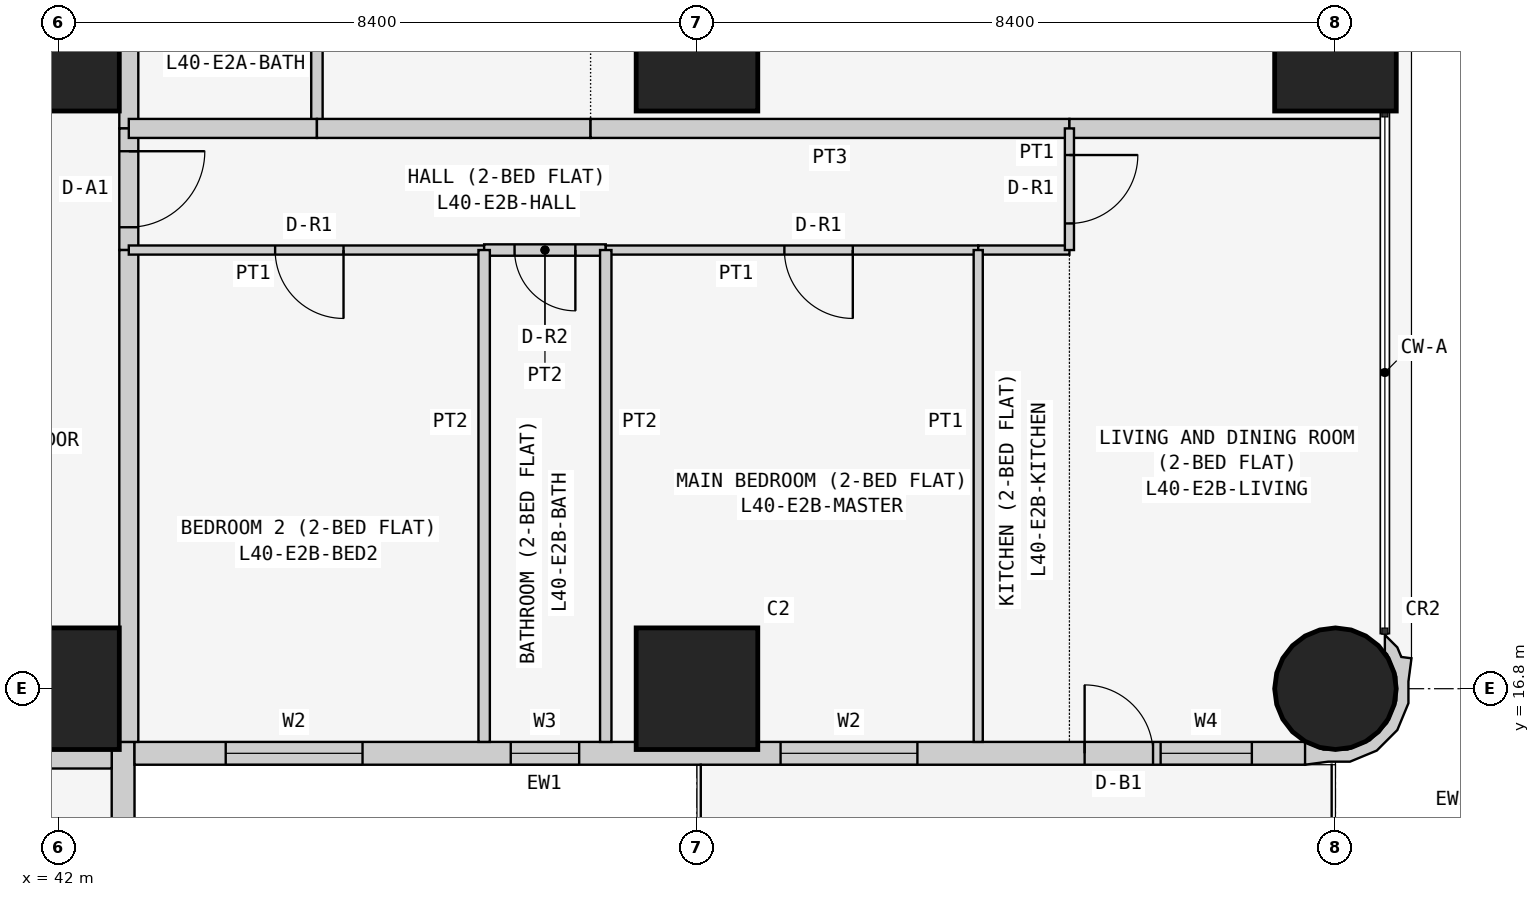
"""IFC4 building model, lengths in metres.
Left out: names, types, materials, properties, quantities, classifications, styles, units other than length and angle.
Written with IfcOpenShell. Run it as: python <this file> out.ifc"""

import sys

from ifc_helpers import new_model, si_unit, direction, frame, frame_2d, origin, origin_2d, place, context, subcontext, project, spatial, polyline, rectangle, circle, outline, extrude, element, fill, save


model = new_model("IFC4")
c1 = context("Model", 3, precision=1e-05, world=origin(), true_north=direction((0.0, 1.0)))
c2 = subcontext(c1, "Body", "Model", "MODEL_VIEW")
j1 = project(units=[si_unit("LENGTHUNIT", "METRE"), si_unit("PLANEANGLEUNIT", "RADIAN")], contexts=[c1])
p1 = place(None, origin())
s1 = spatial("IfcSite", under=j1, at=p1, CompositionType="ELEMENT")
p2 = place(p1, origin())
s2 = spatial("IfcBuilding", under=s1, at=p2, CompositionType="ELEMENT")
p3 = place(p2, frame((0.0, 0.0, 155.7)))
s3 = spatial("IfcBuildingStorey", under=s2, at=p3, CompositionType="ELEMENT", Elevation=155.7)
for number, where, z_axis, x_axis in (
    (1, (42.0, 16.8, 0.0), (0.0, 0.0, 1.0), (1.0, 0.0, 0.0)),
    (2, (42.0, 25.2, 0.0), (0.0, 0.0, 1.0), (1.0, 0.0, 0.0)),
    (3, (50.4, 16.8, 0.0), (0.0, 0.0, 1.0), (1.0, 0.0, 0.0)),
    (4, (50.4, 25.2, 0.0), (0.0, 0.0, 1.0), (1.0, 0.0, 0.0)),
):
    element("IfcColumn", number, at=place(p3, frame(where, z_axis=z_axis, x_axis=x_axis)), inside=s3, PredefinedType="COLUMN", context=c2, shape_type="SweptSolid", body=[
        extrude(rectangle(XDim=1.6, YDim=1.6, at=origin_2d()), origin(), (0.0, 0.0, 1.0), 3.6),
    ])
p4 = place(p3, frame((58.8, 16.8, 0.0), z_axis=(0.0, 0.0, 1.0), x_axis=(1.0, 0.0, 0.0)))
e5 = element("IfcColumn", 5, at=p4, inside=s3, PredefinedType="COLUMN", context=c2, shape_type="SweptSolid", body=[
    extrude(circle(Radius=0.8, at=origin_2d()), origin(), (0.0, 0.0, 1.0), 3.6),
])
p5 = place(p3, frame((58.8, 25.2, 0.0), z_axis=(0.0, 0.0, 1.0), x_axis=(1.0, 0.0, 0.0)))
e6 = element("IfcColumn", 6, at=p5, inside=s3, PredefinedType="COLUMN", context=c2, shape_type="SweptSolid", body=[
    extrude(rectangle(XDim=1.6, YDim=1.6, at=origin_2d()), origin(), (0.0, 0.0, 1.0), 3.6),
])
p6 = place(p3, frame((42.85, 8.8, 0.0), z_axis=(0.0, 0.0, 1.0), x_axis=(0.0, 1.0, 0.0)))
e7 = element("IfcWall", 7, at=p6, inside=s3, PredefinedType="SOLIDWALL", context=c2, shape_type="SweptSolid", body=[
    extrude(rectangle(XDim=7.3, YDim=0.3, at=frame_2d((3.65, 0.0))), origin(), (0.0, 0.0, 1.0), 3.45),
])
p7 = place(p6, frame((3.1, 0.0, 0.9)))
e8 = element("IfcOpeningElement", 8, at=p7, cuts=e7, PredefinedType="OPENING", context=c2, shape_type="SweptSolid", body=[
    extrude(rectangle(XDim=2.4, YDim=1.5, at=frame_2d((1.2, 0.75))), frame((0.0, 0.16, 0.0), z_axis=(0.0, -1.0, 0.0), x_axis=(1.0, 0.0, 0.0)), (0.0, 0.0, 1.0), 0.32),
])
p8 = place(p6, frame((0.75, 0.0, 0.9)))
e9 = element("IfcOpeningElement", 9, at=p8, cuts=e7, PredefinedType="OPENING", context=c2, shape_type="SweptSolid", body=[
    extrude(rectangle(XDim=1.2, YDim=1.5, at=frame_2d((0.6, 0.75))), frame((0.0, 0.16, 0.0), z_axis=(0.0, -1.0, 0.0), x_axis=(1.0, 0.0, 0.0)), (0.0, 0.0, 1.0), 0.32),
])
p9 = place(p3, frame((43.0, 15.95, 0.0), z_axis=(0.0, 0.0, 1.0), x_axis=(1.0, 0.0, 0.0)))
e10 = element("IfcWall", 10, at=p9, inside=s3, PredefinedType="SOLIDWALL", context=c2, shape_type="SweptSolid", body=[
    extrude(rectangle(XDim=15.4, YDim=0.3, at=frame_2d((7.7, 0.0))), origin(), (0.0, 0.0, 1.0), 3.45),
])
p10 = place(p9, frame((1.2, 0.0, 0.9)))
e11 = element("IfcOpeningElement", 11, at=p10, cuts=e10, PredefinedType="OPENING", context=c2, shape_type="SweptSolid", body=[
    extrude(rectangle(XDim=1.8, YDim=1.5, at=frame_2d((0.9, 0.75))), frame((0.0, 0.16, 0.0), z_axis=(0.0, -1.0, 0.0), x_axis=(1.0, 0.0, 0.0)), (0.0, 0.0, 1.0), 0.32),
])
p11 = place(p9, frame((4.95, 0.0, 1.5)))
e12 = element("IfcOpeningElement", 12, at=p11, cuts=e10, PredefinedType="OPENING", context=c2, shape_type="SweptSolid", body=[
    extrude(rectangle(XDim=0.9, YDim=0.7, at=frame_2d((0.45, 0.35))), frame((0.0, 0.16, 0.0), z_axis=(0.0, -1.0, 0.0), x_axis=(1.0, 0.0, 0.0)), (0.0, 0.0, 1.0), 0.32),
])
p12 = place(p9, frame((8.5, 0.0, 0.9)))
e13 = element("IfcOpeningElement", 13, at=p12, cuts=e10, PredefinedType="OPENING", context=c2, shape_type="SweptSolid", body=[
    extrude(rectangle(XDim=1.8, YDim=1.5, at=frame_2d((0.9, 0.75))), frame((0.0, 0.16, 0.0), z_axis=(0.0, -1.0, 0.0), x_axis=(1.0, 0.0, 0.0)), (0.0, 0.0, 1.0), 0.32),
])
p13 = place(p9, frame((12.5, 0.0, 0.0)))
e14 = element("IfcOpeningElement", 14, at=p13, cuts=e10, PredefinedType="OPENING", context=c2, shape_type="SweptSolid", body=[
    extrude(rectangle(XDim=0.9, YDim=2.4, at=frame_2d((0.45, 1.2))), frame((0.0, 0.16, 0.0), z_axis=(0.0, -1.0, 0.0), x_axis=(1.0, 0.0, 0.0)), (0.0, 0.0, 1.0), 0.32),
])
p14 = place(p9, frame((13.5, 0.0, 0.9)))
e15 = element("IfcOpeningElement", 15, at=p14, cuts=e10, PredefinedType="OPENING", context=c2, shape_type="SweptSolid", body=[
    extrude(rectangle(XDim=1.2, YDim=1.5, at=frame_2d((0.6, 0.75))), frame((0.0, 0.16, 0.0), z_axis=(0.0, -1.0, 0.0), x_axis=(1.0, 0.0, 0.0)), (0.0, 0.0, 1.0), 0.32),
])
p15 = place(p3, frame((58.473, 15.983, 0.0), z_axis=(0.0, 0.0, 1.0), x_axis=(0.93923434088, -0.343276641956, 0.0)))
e16 = element("IfcWall", 16, at=p15, inside=s3, PredefinedType="SOLIDWALL", context=c2, shape_type="SweptSolid", body=[
    extrude(outline(polyline([(0.828, 1.599), (0.697, 1.569), (0.604, 1.67), (0.394, 1.767), (0.471, 1.556), (0.508, 1.539), (0.724, 1.304), (0.834, 1.005), (0.82, 0.686), (0.686, 0.397), (0.451, 0.182), (0.152, 0.073), (-0.116, 0.084), (-0.127, 0.078), (-0.146, 0.071), (-0.006, -0.197), (0.266, -0.055), (0.535, 0.044), (0.817, 0.302), (0.978, 0.648), (0.994, 1.03), (0.895, 1.3), (0.828, 1.599)])), origin(), (0.0, 0.0, 1.0), 3.45),
])
p16 = place(p3, frame((42.925, 26.8, 0.0), z_axis=(0.0, 0.0, 1.0), x_axis=(0.0, -1.0, 0.0)))
e17 = element("IfcWall", 17, at=p16, inside=s3, PredefinedType="PARTITIONING", context=c2, shape_type="SweptSolid", body=[
    extrude(rectangle(XDim=2.629, YDim=0.25, at=frame_2d((1.314, 0.0))), origin(), (0.0, 0.0, 1.0), 3.45),
])
p17 = place(p3, frame((42.925, 24.171, 0.0), z_axis=(0.0, 0.0, 1.0), x_axis=(0.0, -1.0, 0.0)))
e18 = element("IfcWall", 18, at=p17, inside=s3, PredefinedType="PARTITIONING", context=c2, shape_type="SweptSolid", body=[
    extrude(rectangle(XDim=1.6, YDim=0.25, at=frame_2d((0.8, 0.0))), origin(), (0.0, 0.0, 1.0), 3.45),
])
p18 = place(p17, frame((0.3, 0.0, 0.0)))
e19 = element("IfcOpeningElement", 19, at=p18, cuts=e18, PredefinedType="OPENING", context=c2, shape_type="SweptSolid", body=[
    extrude(rectangle(XDim=1.0, YDim=2.1, at=frame_2d((0.5, 1.05))), frame((0.0, 0.135, 0.0), z_axis=(0.0, -1.0, 0.0), x_axis=(1.0, 0.0, 0.0)), (0.0, 0.0, 1.0), 0.27),
])
for number, where, z_axis, x_axis in (
    (20, (42.925, 22.571, 0.0), (0.0, 0.0, 1.0), (0.0, -1.0, 0.0)),
    (21, (42.7, 15.875, 0.0), (0.0, 0.0, 1.0), (-1.0, 0.0, 0.0)),
):
    element("IfcWall", number, at=place(p3, frame(where, z_axis=z_axis, x_axis=x_axis)), inside=s3, PredefinedType="PARTITIONING", context=c2, shape_type="SweptSolid", body=[
        extrude(rectangle(XDim=6.471, YDim=0.25, at=frame_2d((3.235, 0.0))), origin(), (0.0, 0.0, 1.0), 3.45),
    ])
p19 = place(p3, frame((45.4, 26.8, 0.0), z_axis=(0.0, 0.0, 1.0), x_axis=(0.0, -1.0, 0.0)))
e22 = element("IfcWall", 22, at=p19, inside=s3, PredefinedType="PARTITIONING", context=c2, shape_type="SweptSolid", body=[
    extrude(rectangle(XDim=2.629, YDim=0.15, at=frame_2d((1.314, 0.0))), origin(), (0.0, 0.0, 1.0), 3.45),
])
p20 = place(p3, frame((45.4, 24.171, 0.0), z_axis=(0.0, 0.0, 1.0), x_axis=(-1.0, 0.0, 0.0)))
e23 = element("IfcWall", 23, at=p20, inside=s3, PredefinedType="PARTITIONING", context=c2, shape_type="SweptSolid", body=[
    extrude(rectangle(XDim=2.475, YDim=0.25, at=frame_2d((1.237, 0.0))), origin(), (0.0, 0.0, 1.0), 3.45),
])
p21 = place(p3, frame((49.0, 24.171, 0.0), z_axis=(0.0, 0.0, 1.0), x_axis=(-1.0, 0.0, 0.0)))
e24 = element("IfcWall", 24, at=p21, inside=s3, PredefinedType="PARTITIONING", context=c2, shape_type="SweptSolid", body=[
    extrude(rectangle(XDim=3.6, YDim=0.25, at=frame_2d((1.8, 0.0))), origin(), (0.0, 0.0, 1.0), 3.45),
])
p22 = place(p3, frame((55.3, 24.171, 0.0), z_axis=(0.0, 0.0, 1.0), x_axis=(-1.0, 0.0, 0.0)))
e25 = element("IfcWall", 25, at=p22, inside=s3, PredefinedType="PARTITIONING", context=c2, shape_type="SweptSolid", body=[
    extrude(rectangle(XDim=6.3, YDim=0.25, at=frame_2d((3.15, 0.0))), origin(), (0.0, 0.0, 1.0), 3.45),
])
p23 = place(p3, frame((59.45, 24.171, 0.0), z_axis=(0.0, 0.0, 1.0), x_axis=(-1.0, 0.0, 0.0)))
e26 = element("IfcWall", 26, at=p23, inside=s3, PredefinedType="PARTITIONING", context=c2, shape_type="SweptSolid", body=[
    extrude(rectangle(XDim=4.15, YDim=0.25, at=frame_2d((2.075, 0.0))), origin(), (0.0, 0.0, 1.0), 3.45),
])
p24 = place(p3, frame((47.6, 22.571, 0.0), z_axis=(0.0, 0.0, 1.0), x_axis=(-1.0, 0.0, 0.0)))
e27 = element("IfcWall", 27, at=p24, inside=s3, PredefinedType="PARTITIONING", context=c2, shape_type="SweptSolid", body=[
    extrude(rectangle(XDim=4.675, YDim=0.12, at=frame_2d((2.337, 0.0))), origin(), (0.0, 0.0, 1.0), 3.45),
])
p25 = place(p24, frame((1.85, 0.0, 0.0)))
e28 = element("IfcOpeningElement", 28, at=p25, cuts=e27, PredefinedType="OPENING", context=c2, shape_type="SweptSolid", body=[
    extrude(rectangle(XDim=0.9, YDim=2.1, at=frame_2d((0.45, 1.05))), frame((0.0, 0.07, 0.0), z_axis=(0.0, -1.0, 0.0), x_axis=(1.0, 0.0, 0.0)), (0.0, 0.0, 1.0), 0.14),
])
p26 = place(p3, frame((49.2, 22.571, 0.0), z_axis=(0.0, 0.0, 1.0), x_axis=(-1.0, 0.0, 0.0)))
e29 = element("IfcWall", 29, at=p26, inside=s3, PredefinedType="PARTITIONING", context=c2, shape_type="SweptSolid", body=[
    extrude(rectangle(XDim=1.6, YDim=0.15, at=frame_2d((0.8, 0.0))), origin(), (0.0, 0.0, 1.0), 3.45),
])
p27 = place(p26, frame((0.4, 0.0, 0.0)))
e30 = element("IfcOpeningElement", 30, at=p27, cuts=e29, PredefinedType="OPENING", context=c2, shape_type="SweptSolid", body=[
    extrude(rectangle(XDim=0.8, YDim=2.1, at=frame_2d((0.4, 1.05))), frame((0.0, 0.085, 0.0), z_axis=(0.0, -1.0, 0.0), x_axis=(1.0, 0.0, 0.0)), (0.0, 0.0, 1.0), 0.17),
])
p28 = place(p3, frame((54.1, 22.571, 0.0), z_axis=(0.0, 0.0, 1.0), x_axis=(-1.0, 0.0, 0.0)))
e31 = element("IfcWall", 31, at=p28, inside=s3, PredefinedType="PARTITIONING", context=c2, shape_type="SweptSolid", body=[
    extrude(rectangle(XDim=4.9, YDim=0.12, at=frame_2d((2.45, 0.0))), origin(), (0.0, 0.0, 1.0), 3.45),
])
p29 = place(p28, frame((1.65, 0.0, 0.0)))
e32 = element("IfcOpeningElement", 32, at=p29, cuts=e31, PredefinedType="OPENING", context=c2, shape_type="SweptSolid", body=[
    extrude(rectangle(XDim=0.9, YDim=2.1, at=frame_2d((0.45, 1.05))), frame((0.0, 0.07, 0.0), z_axis=(0.0, -1.0, 0.0), x_axis=(1.0, 0.0, 0.0)), (0.0, 0.0, 1.0), 0.14),
])
p30 = place(p3, frame((55.3, 22.571, 0.0), z_axis=(0.0, 0.0, 1.0), x_axis=(-1.0, 0.0, 0.0)))
e33 = element("IfcWall", 33, at=p30, inside=s3, PredefinedType="PARTITIONING", context=c2, shape_type="SweptSolid", body=[
    extrude(rectangle(XDim=1.2, YDim=0.12, at=frame_2d((0.6, 0.0))), origin(), (0.0, 0.0, 1.0), 3.45),
])
p31 = place(p3, frame((55.3, 24.171, 0.0), z_axis=(0.0, 0.0, 1.0), x_axis=(0.0, -1.0, 0.0)))
e34 = element("IfcWall", 34, at=p31, inside=s3, PredefinedType="PARTITIONING", context=c2, shape_type="SweptSolid", body=[
    extrude(rectangle(XDim=1.6, YDim=0.12, at=frame_2d((0.8, 0.0))), origin(), (0.0, 0.0, 1.0), 3.45),
])
p32 = place(p31, frame((0.35, 0.0, 0.0)))
e35 = element("IfcOpeningElement", 35, at=p32, cuts=e34, PredefinedType="OPENING", context=c2, shape_type="SweptSolid", body=[
    extrude(rectangle(XDim=0.9, YDim=2.1, at=frame_2d((0.45, 1.05))), frame((0.0, 0.07, 0.0), z_axis=(0.0, -1.0, 0.0), x_axis=(1.0, 0.0, 0.0)), (0.0, 0.0, 1.0), 0.14),
])
for number, where, z_axis, x_axis in (
    (36, (47.6, 22.571, 0.0), (0.0, 0.0, 1.0), (0.0, -1.0, 0.0)),
    (37, (49.2, 22.571, 0.0), (0.0, 0.0, 1.0), (0.0, -1.0, 0.0)),
):
    element("IfcWall", number, at=place(p3, frame(where, z_axis=z_axis, x_axis=x_axis)), inside=s3, PredefinedType="PARTITIONING", context=c2, shape_type="SweptSolid", body=[
        extrude(rectangle(XDim=6.471, YDim=0.15, at=frame_2d((3.235, 0.0))), origin(), (0.0, 0.0, 1.0), 3.45),
    ])
p33 = place(p3, frame((54.1, 22.571, 0.0), z_axis=(0.0, 0.0, 1.0), x_axis=(0.0, -1.0, 0.0)))
e38 = element("IfcWall", 38, at=p33, inside=s3, PredefinedType="PARTITIONING", context=c2, shape_type="SweptSolid", body=[
    extrude(rectangle(XDim=6.471, YDim=0.12, at=frame_2d((3.235, 0.0))), origin(), (0.0, 0.0, 1.0), 3.45),
])
p34 = place(p10, origin())
e39 = element("IfcWindow", 39, at=p34, inside=s3, PartitioningType="SINGLE_PANEL", PredefinedType="WINDOW", context=c2, shape_type="SweptSolid", body=[
    extrude(rectangle(XDim=1.8, YDim=1.5, at=frame_2d((0.9, 0.75))), frame((0.0, 0.03, 0.0), z_axis=(0.0, -1.0, 0.0), x_axis=(1.0, 0.0, 0.0)), (0.0, 0.0, 1.0), 0.06),
])
fill(e11, e39)
p35 = place(p11, origin())
e40 = element("IfcWindow", 40, at=p35, inside=s3, PartitioningType="SINGLE_PANEL", PredefinedType="WINDOW", context=c2, shape_type="SweptSolid", body=[
    extrude(rectangle(XDim=0.9, YDim=0.7, at=frame_2d((0.45, 0.35))), frame((0.0, 0.03, 0.0), z_axis=(0.0, -1.0, 0.0), x_axis=(1.0, 0.0, 0.0)), (0.0, 0.0, 1.0), 0.06),
])
fill(e12, e40)
p36 = place(p12, origin())
e41 = element("IfcWindow", 41, at=p36, inside=s3, PartitioningType="SINGLE_PANEL", PredefinedType="WINDOW", context=c2, shape_type="SweptSolid", body=[
    extrude(rectangle(XDim=1.8, YDim=1.5, at=frame_2d((0.9, 0.75))), frame((0.0, 0.03, 0.0), z_axis=(0.0, -1.0, 0.0), x_axis=(1.0, 0.0, 0.0)), (0.0, 0.0, 1.0), 0.06),
])
fill(e13, e41)
p37 = place(p13, origin())
e42 = element("IfcDoor", 42, at=p37, inside=s3, OperationType="SINGLE_SWING_LEFT", PredefinedType="DOOR", context=c2, shape_type="SweptSolid", body=[
    extrude(rectangle(XDim=0.9, YDim=2.4, at=frame_2d((0.45, 1.2))), frame((0.0, 0.025, 0.0), z_axis=(0.0, -1.0, 0.0), x_axis=(1.0, 0.0, 0.0)), (0.0, 0.0, 1.0), 0.05),
])
fill(e14, e42)
p38 = place(p14, origin())
e43 = element("IfcWindow", 43, at=p38, inside=s3, PartitioningType="SINGLE_PANEL", PredefinedType="WINDOW", context=c2, shape_type="SweptSolid", body=[
    extrude(rectangle(XDim=1.2, YDim=1.5, at=frame_2d((0.6, 0.75))), frame((0.0, 0.03, 0.0), z_axis=(0.0, -1.0, 0.0), x_axis=(1.0, 0.0, 0.0)), (0.0, 0.0, 1.0), 0.06),
])
fill(e15, e43)
p39 = place(p18, origin())
e44 = element("IfcDoor", 44, at=p39, inside=s3, OperationType="SINGLE_SWING_LEFT", PredefinedType="DOOR", context=c2, shape_type="SweptSolid", body=[
    extrude(rectangle(XDim=1.0, YDim=2.1, at=frame_2d((0.5, 1.05))), frame((0.0, 0.025, 0.0), z_axis=(0.0, -1.0, 0.0), x_axis=(1.0, 0.0, 0.0)), (0.0, 0.0, 1.0), 0.05),
])
fill(e19, e44)
p40 = place(p25, origin())
e45 = element("IfcDoor", 45, at=p40, inside=s3, OperationType="SINGLE_SWING_LEFT", PredefinedType="DOOR", context=c2, shape_type="SweptSolid", body=[
    extrude(rectangle(XDim=0.9, YDim=2.1, at=frame_2d((0.45, 1.05))), frame((0.0, 0.025, 0.0), z_axis=(0.0, -1.0, 0.0), x_axis=(1.0, 0.0, 0.0)), (0.0, 0.0, 1.0), 0.05),
])
fill(e28, e45)
p41 = place(p27, origin())
e46 = element("IfcDoor", 46, at=p41, inside=s3, OperationType="SINGLE_SWING_LEFT", PredefinedType="DOOR", context=c2, shape_type="SweptSolid", body=[
    extrude(rectangle(XDim=0.8, YDim=2.1, at=frame_2d((0.4, 1.05))), frame((0.0, 0.025, 0.0), z_axis=(0.0, -1.0, 0.0), x_axis=(1.0, 0.0, 0.0)), (0.0, 0.0, 1.0), 0.05),
])
fill(e30, e46)
p42 = place(p29, origin())
e47 = element("IfcDoor", 47, at=p42, inside=s3, OperationType="SINGLE_SWING_LEFT", PredefinedType="DOOR", context=c2, shape_type="SweptSolid", body=[
    extrude(rectangle(XDim=0.9, YDim=2.1, at=frame_2d((0.45, 1.05))), frame((0.0, 0.025, 0.0), z_axis=(0.0, -1.0, 0.0), x_axis=(1.0, 0.0, 0.0)), (0.0, 0.0, 1.0), 0.05),
])
fill(e32, e47)
p43 = place(p32, origin())
e48 = element("IfcDoor", 48, at=p43, inside=s3, OperationType="SINGLE_SWING_LEFT", PredefinedType="DOOR", context=c2, shape_type="SweptSolid", body=[
    extrude(rectangle(XDim=0.9, YDim=2.1, at=frame_2d((0.45, 1.05))), frame((0.0, 0.025, 0.0), z_axis=(0.0, -1.0, 0.0), x_axis=(1.0, 0.0, 0.0)), (0.0, 0.0, 1.0), 0.05),
])
fill(e35, e48)
save(model, sys.argv[1])
